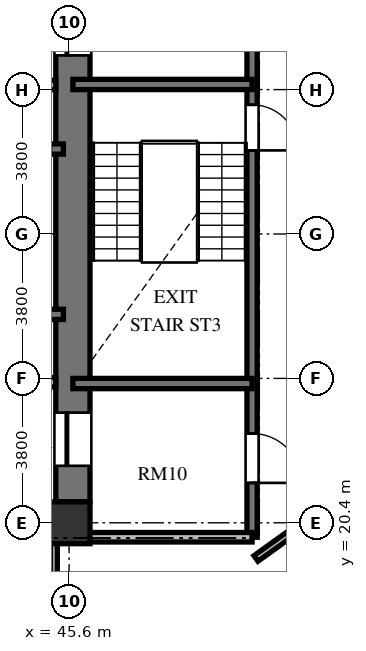
"""IFC4 building model, lengths in metres.
Left out: names, types, materials, properties, quantities, classifications, styles, units other than length and angle.
Written with IfcOpenShell. Run it as: python <this file> out.ifc"""

import sys

from ifc_helpers import new_model, si_unit, direction, frame, frame_2d, origin, origin_2d, place, context, subcontext, project, spatial, rectangle, extrude, element, fill, save


model = new_model("IFC4")
c1 = context("Model", 3, precision=1e-05, world=origin(), true_north=direction((0.0, 1.0)))
c2 = subcontext(c1, "Body", "Model", "MODEL_VIEW")
j1 = project(units=[si_unit("LENGTHUNIT", "METRE"), si_unit("PLANEANGLEUNIT", "RADIAN")], contexts=[c1])
p1 = place(None, origin())
s1 = spatial("IfcSite", under=j1, at=p1, CompositionType="ELEMENT")
p2 = place(p1, origin())
s2 = spatial("IfcBuilding", under=s1, at=p2, CompositionType="ELEMENT")
p3 = place(p2, frame((0.0, 0.0, 65.328)))
s3 = spatial("IfcBuildingStorey", under=s2, at=p3, CompositionType="ELEMENT", Elevation=65.328)
p4 = place(p3, frame((45.6, 20.4, 0.0), z_axis=(0.0, 0.0, 1.0), x_axis=(1.0, 0.0, 0.0)))
e1 = element("IfcColumn", 1, at=p4, inside=s3, PredefinedType="COLUMN", context=c2, shape_type="SweptSolid", body=[
    extrude(rectangle(XDim=1.1, YDim=1.1, at=origin_2d()), origin(), (0.0, 0.0, 1.0), 3.648),
])
p5 = place(p3, frame((45.7, 20.95, 0.0), z_axis=(0.0, 0.0, 1.0), x_axis=(0.0, 1.0, 0.0)))
e2 = element("IfcWall", 2, at=p5, inside=s3, PredefinedType="SHEAR", context=c2, shape_type="SweptSolid", body=[
    extrude(rectangle(XDim=14.1, YDim=0.9, at=frame_2d((7.05, 0.0))), origin(), (0.0, 0.0, 1.0), 3.648),
])
p6 = place(p5, frame((11.75, 0.0, 0.0)))
e3 = element("IfcOpeningElement", 3, at=p6, cuts=e2, PredefinedType="OPENING", context=c2, shape_type="SweptSolid", body=[
    extrude(rectangle(XDim=1.4, YDim=2.3, at=frame_2d((0.7, 1.15))), frame((0.0, 0.46, 0.0), z_axis=(0.0, -1.0, 0.0), x_axis=(1.0, 0.0, 0.0)), (0.0, 0.0, 1.0), 0.92),
])
p7 = place(p5, frame((0.95, 0.0, 0.0)))
e4 = element("IfcOpeningElement", 4, at=p7, cuts=e2, PredefinedType="OPENING", context=c2, shape_type="SweptSolid", body=[
    extrude(rectangle(XDim=1.4, YDim=2.3, at=frame_2d((0.7, 1.15))), frame((0.0, 0.46, 0.0), z_axis=(0.0, -1.0, 0.0), x_axis=(1.0, 0.0, 0.0)), (0.0, 0.0, 1.0), 0.92),
])
p8 = place(p3, frame((37.465, 30.235, 0.0), z_axis=(0.0, 0.0, 1.0), x_axis=(1.0, 0.0, 0.0)))
e5 = element("IfcWall", 5, at=p8, inside=s3, PredefinedType="SHEAR", context=c2, shape_type="SweptSolid", body=[
    extrude(rectangle(XDim=7.985, YDim=0.27, at=frame_2d((3.992, 0.0))), origin(), (0.0, 0.0, 1.0), 3.648),
])
p9 = place(p8, frame((6.455, 0.0, 0.0)))
e6 = element("IfcOpeningElement", 6, at=p9, cuts=e5, PredefinedType="OPENING", context=c2, shape_type="SweptSolid", body=[
    extrude(rectangle(XDim=1.2, YDim=2.15, at=frame_2d((0.6, 1.075))), frame((0.0, 0.145, 0.0), z_axis=(0.0, -1.0, 0.0), x_axis=(1.0, 0.0, 0.0)), (0.0, 0.0, 1.0), 0.29),
])
p10 = place(p3, frame((37.465, 25.885, 0.0), z_axis=(0.0, 0.0, 1.0), x_axis=(1.0, 0.0, 0.0)))
e7 = element("IfcWall", 7, at=p10, inside=s3, PredefinedType="SHEAR", context=c2, shape_type="SweptSolid", body=[
    extrude(rectangle(XDim=7.985, YDim=0.27, at=frame_2d((3.992, 0.0))), origin(), (0.0, 0.0, 1.0), 3.648),
])
for number, where, z_axis, x_axis in (
    (8, (42.95, 31.92, 0.0), (0.0, 0.0, 1.0), (1.0, 0.0, 0.0)),
    (9, (42.95, 24.1, 0.0), (0.0, 0.0, 1.0), (1.0, 0.0, 0.0)),
):
    element("IfcWall", number, at=place(p3, frame(where, z_axis=z_axis, x_axis=x_axis)), inside=s3, PredefinedType="SOLIDWALL", context=c2, shape_type="SweptSolid", body=[
        extrude(rectangle(XDim=2.3, YDim=0.25, at=frame_2d((1.15, 0.0))), origin(), (0.0, 0.0, 1.0), 3.428),
    ])
p11 = place(p3, frame((50.415, 35.845, 0.0), z_axis=(0.0, 0.0, 1.0), x_axis=(0.0, -1.0, 0.0)))
e10 = element("IfcWall", 10, at=p11, inside=s3, PredefinedType="SHEAR", context=c2, shape_type="SweptSolid", body=[
    extrude(rectangle(XDim=15.825, YDim=0.27, at=frame_2d((7.913, 0.0))), origin(), (0.0, 0.0, 1.0), 3.648),
])
p12 = place(p11, frame((4.445, 0.0, 0.0)))
e11 = element("IfcOpeningElement", 11, at=p12, cuts=e10, PredefinedType="OPENING", context=c2, shape_type="SweptSolid", body=[
    extrude(rectangle(XDim=1.2, YDim=2.15, at=frame_2d((0.6, 1.075))), frame((0.0, 0.145, 0.0), z_axis=(0.0, -1.0, 0.0), x_axis=(1.0, 0.0, 0.0)), (0.0, 0.0, 1.0), 0.29),
])
p13 = place(p11, frame((1.295, 0.0, 0.0)))
e12 = element("IfcOpeningElement", 12, at=p13, cuts=e10, PredefinedType="OPENING", context=c2, shape_type="SweptSolid", body=[
    extrude(rectangle(XDim=1.3, YDim=2.2, at=frame_2d((0.65, 1.1))), frame((0.0, 0.145, 0.0), z_axis=(0.0, -1.0, 0.0), x_axis=(1.0, 0.0, 0.0)), (0.0, 0.0, 1.0), 0.29),
])
p14 = place(p11, frame((13.095, 0.0, 0.0)))
e13 = element("IfcOpeningElement", 13, at=p14, cuts=e10, PredefinedType="OPENING", context=c2, shape_type="SweptSolid", body=[
    extrude(rectangle(XDim=1.3, YDim=2.2, at=frame_2d((0.65, 1.1))), frame((0.0, 0.145, 0.0), z_axis=(0.0, -1.0, 0.0), x_axis=(1.0, 0.0, 0.0)), (0.0, 0.0, 1.0), 0.29),
])
for number, where, z_axis, x_axis in (
    (14, (45.7, 31.935, 0.0), (0.0, 0.0, 1.0), (1.0, 0.0, 0.0)),
    (15, (45.7, 24.065, 0.0), (0.0, 0.0, 1.0), (1.0, 0.0, 0.0)),
):
    element("IfcWall", number, at=place(p3, frame(where, z_axis=z_axis, x_axis=x_axis)), inside=s3, PredefinedType="SHEAR", context=c2, shape_type="SweptSolid", body=[
        extrude(rectangle(XDim=4.715, YDim=0.27, at=frame_2d((2.357, 0.0))), origin(), (0.0, 0.0, 1.0), 3.648),
    ])
p15 = place(p3, frame((45.7, 20.02, 0.0), z_axis=(0.0, 0.0, 1.0), x_axis=(1.0, 0.0, 0.0)))
e16 = element("IfcWall", 16, at=p15, inside=s3, PredefinedType="SOLIDWALL", context=c2, shape_type="SweptSolid", body=[
    extrude(rectangle(XDim=4.715, YDim=0.25, at=frame_2d((2.357, 0.0))), origin(), (0.0, 0.0, 1.0), 2.813),
])
p16 = place(p3, frame((53.183, 21.376, 0.0), z_axis=(0.0, 0.0, 1.0), x_axis=(-0.812151980909, -0.583445935717, 0.0)))
e17 = element("IfcWall", 17, at=p16, inside=s3, PredefinedType="PARTITIONING", context=c2, shape_type="SweptSolid", body=[
    extrude(rectangle(XDim=3.281, YDim=0.18, at=frame_2d((1.641, 0.0))), origin(), (0.0, 0.0, 1.0), 3.428),
])
p17 = place(p3, frame((45.2, 19.91, 0.0), z_axis=(0.0, 0.0, 1.0), x_axis=(0.0, -1.0, 0.0)))
e18 = element("IfcWall", 18, at=p17, inside=s3, PredefinedType="PARTITIONING", context=c2, shape_type="SweptSolid", body=[
    extrude(rectangle(XDim=2.55, YDim=0.18, at=frame_2d((1.275, 0.0))), origin(), (0.0, 0.0, 1.0), 3.428),
])
p18 = place(p6, origin())
e19 = element("IfcDoor", 19, at=p18, inside=s3, OperationType="SLIDING_TO_LEFT", PredefinedType="DOOR", context=c2, shape_type="SweptSolid", body=[
    extrude(rectangle(XDim=1.4, YDim=2.3, at=frame_2d((0.7, 1.15))), frame((0.0, 0.025, 0.0), z_axis=(0.0, -1.0, 0.0), x_axis=(1.0, 0.0, 0.0)), (0.0, 0.0, 1.0), 0.05),
])
fill(e3, e19)
p19 = place(p7, origin())
e20 = element("IfcDoor", 20, at=p19, inside=s3, OperationType="SLIDING_TO_LEFT", PredefinedType="DOOR", context=c2, shape_type="SweptSolid", body=[
    extrude(rectangle(XDim=1.4, YDim=2.3, at=frame_2d((0.7, 1.15))), frame((0.0, 0.025, 0.0), z_axis=(0.0, -1.0, 0.0), x_axis=(1.0, 0.0, 0.0)), (0.0, 0.0, 1.0), 0.05),
])
fill(e4, e20)
p20 = place(p12, origin())
e21 = element("IfcDoor", 21, at=p20, inside=s3, OperationType="SINGLE_SWING_RIGHT", PredefinedType="DOOR", context=c2, shape_type="SweptSolid", body=[
    extrude(rectangle(XDim=1.2, YDim=2.15, at=frame_2d((0.6, 1.075))), frame((0.0, 0.025, 0.0), z_axis=(0.0, -1.0, 0.0), x_axis=(1.0, 0.0, 0.0)), (0.0, 0.0, 1.0), 0.05),
])
fill(e11, e21)
p21 = place(p14, origin())
e22 = element("IfcDoor", 22, at=p21, inside=s3, OperationType="SINGLE_SWING_RIGHT", PredefinedType="DOOR", context=c2, shape_type="SweptSolid", body=[
    extrude(rectangle(XDim=1.3, YDim=2.2, at=frame_2d((0.65, 1.1))), frame((0.0, 0.025, 0.0), z_axis=(0.0, -1.0, 0.0), x_axis=(1.0, 0.0, 0.0)), (0.0, 0.0, 1.0), 0.05),
])
fill(e13, e22)
save(model, sys.argv[1])
